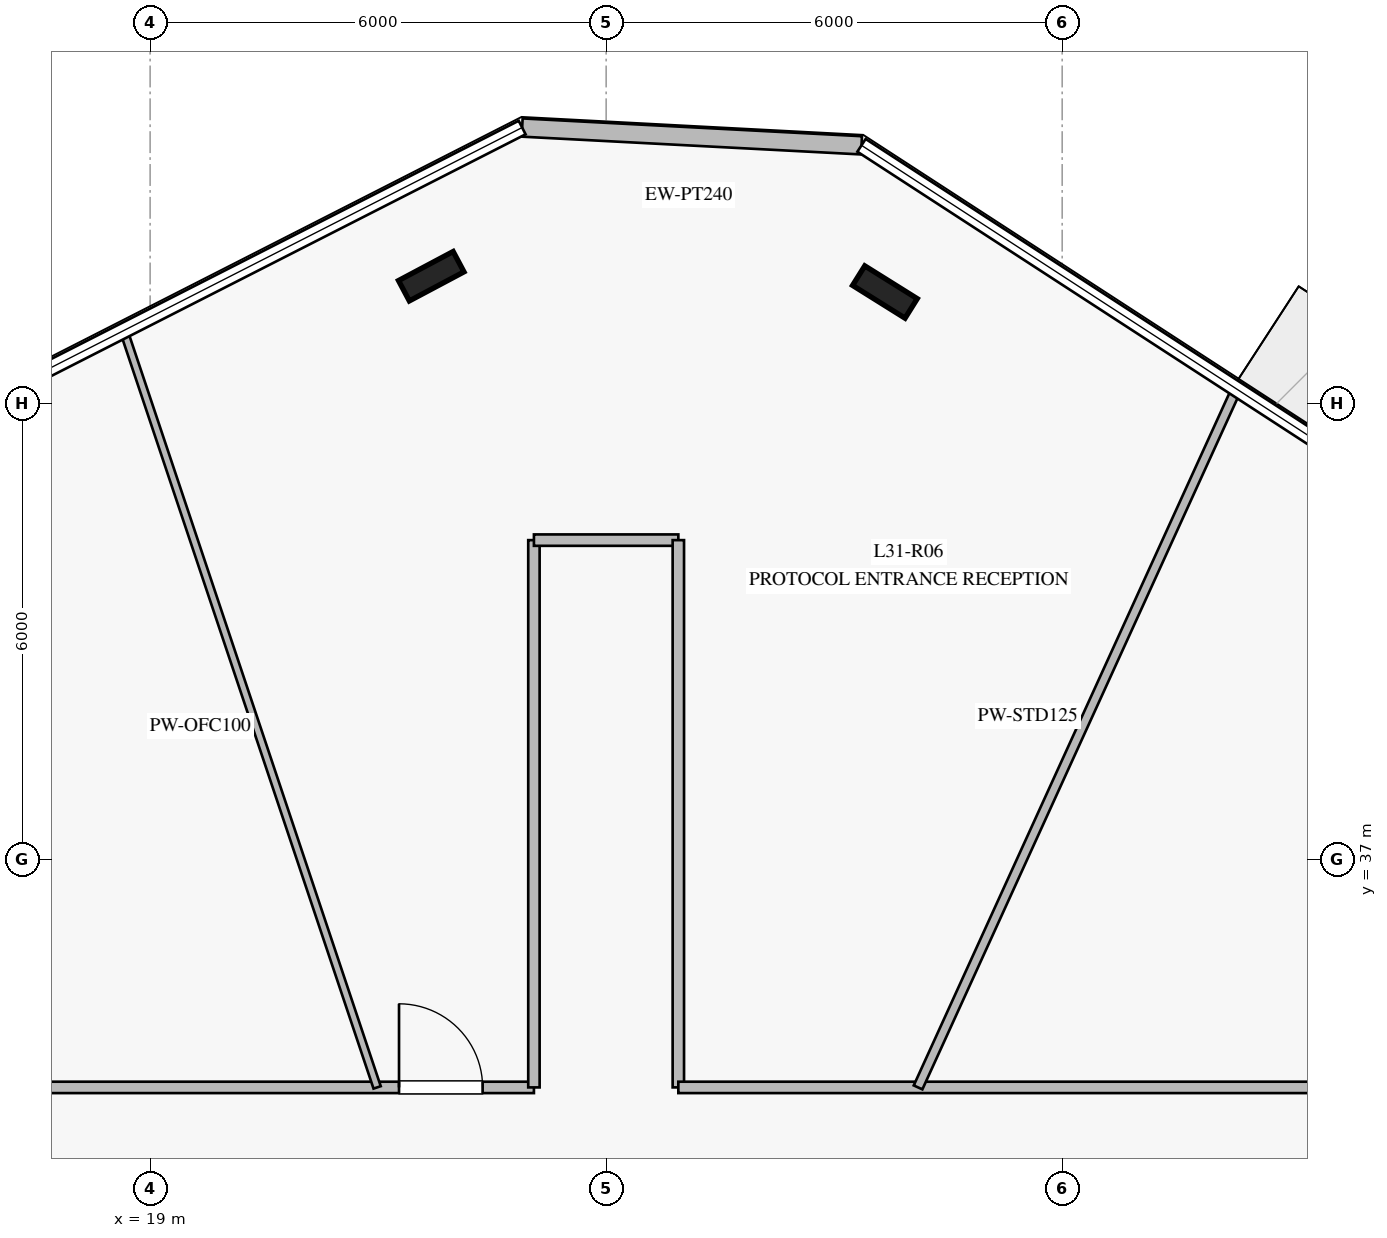
"""IFC4 building model, lengths in metres.
Left out: names, types, materials, properties, quantities, classifications, styles, units other than length and angle.
Written with IfcOpenShell. Run it as: python <this file> out.ifc"""

import sys

from ifc_helpers import new_model, si_unit, direction, frame, frame_2d, origin, origin_2d, place, context, subcontext, project, spatial, rectangle, i_section, extrude, element, fill, save


model = new_model("IFC4")
c1 = context("Model", 3, precision=1e-05, world=origin(), true_north=direction((0.0, 1.0)))
c2 = subcontext(c1, "Body", "Model", "MODEL_VIEW")
j1 = project(units=[si_unit("LENGTHUNIT", "METRE"), si_unit("PLANEANGLEUNIT", "RADIAN")], contexts=[c1])
p1 = place(None, origin())
s1 = spatial("IfcSite", under=j1, at=p1, CompositionType="ELEMENT")
p2 = place(p1, origin())
s2 = spatial("IfcBuilding", under=s1, at=p2, CompositionType="ELEMENT")
p3 = place(p2, frame((0.0, 0.0, 130.4)))
s3 = spatial("IfcBuildingStorey", under=s2, at=p3, CompositionType="ELEMENT", Elevation=130.4)
for number, where, z_axis, x_axis in (
    (1, (28.668, 44.464, 0.0), (0.0, 0.0, 1.0), (-0.848, 0.53, 0.0)),
    (2, (22.699, 44.672, 0.0), (0.0, 0.0, 1.0), (0.883, 0.469, 0.0)),
):
    element("IfcColumn", number, at=place(p3, frame(where, z_axis=z_axis, x_axis=x_axis)), inside=s3, PredefinedType="COLUMN", context=c2, shape_type="SweptSolid", body=[
        extrude(i_section(OverallWidth=0.303, OverallDepth=0.814, WebThickness=0.021, FlangeThickness=0.04, at=origin_2d()), origin(), (0.0, 0.0, 1.0), 4.0),
    ])
p4 = place(p3, frame((28.36, 46.394, 0.0), z_axis=(0.0, 0.0, 1.0), x_axis=(-0.998630920983, 0.052309498732, 0.0)))
e3 = element("IfcWall", 3, at=p4, inside=s3, PredefinedType="STANDARD", context=c2, shape_type="SweptSolid", body=[
    extrude(rectangle(XDim=4.471, YDim=0.24, at=frame_2d((2.236, 0.0))), origin(), (0.0, 0.0, 1.0), 3.76),
])
p5 = place(p3, frame((17.2, 34.0, 0.0), z_axis=(0.0, 0.0, 1.0), x_axis=(1.0, 0.0, 0.0)))
e4 = element("IfcWall", 4, at=p5, inside=s3, PredefinedType="PARTITIONING", context=c2, shape_type="SweptSolid", body=[
    extrude(rectangle(XDim=6.85, YDim=0.15, at=frame_2d((3.425, 0.0))), origin(), (0.0, 0.0, 1.0), 3.21),
])
p6 = place(p5, frame((5.075, 0.0, 0.0)))
e5 = element("IfcOpeningElement", 5, at=p6, cuts=e4, PredefinedType="OPENING", context=c2, shape_type="SweptSolid", body=[
    extrude(rectangle(XDim=1.1, YDim=2.2, at=frame_2d((0.55, 1.1))), frame((0.0, 0.085, 0.0), z_axis=(0.0, -1.0, 0.0), x_axis=(1.0, 0.0, 0.0)), (0.0, 0.0, 1.0), 0.17),
])
p7 = place(p3, frame((24.05, 34.0, 0.0), z_axis=(0.0, 0.0, 1.0), x_axis=(0.0, 1.0, 0.0)))
e6 = element("IfcWall", 6, at=p7, inside=s3, PredefinedType="PARTITIONING", context=c2, shape_type="SweptSolid", body=[
    extrude(rectangle(XDim=7.2, YDim=0.15, at=frame_2d((3.6, 0.0))), origin(), (0.0, 0.0, 1.0), 3.36),
])
p8 = place(p3, frame((24.05, 41.2, 0.0), z_axis=(0.0, 0.0, 1.0), x_axis=(1.0, 0.0, 0.0)))
e7 = element("IfcWall", 7, at=p8, inside=s3, PredefinedType="PARTITIONING", context=c2, shape_type="SweptSolid", body=[
    extrude(rectangle(XDim=1.9, YDim=0.15, at=frame_2d((0.95, 0.0))), origin(), (0.0, 0.0, 1.0), 3.76),
])
p9 = place(p3, frame((25.95, 41.2, 0.0), z_axis=(0.0, 0.0, 1.0), x_axis=(0.0, -1.0, 0.0)))
e8 = element("IfcWall", 8, at=p9, inside=s3, PredefinedType="PARTITIONING", context=c2, shape_type="SweptSolid", body=[
    extrude(rectangle(XDim=7.2, YDim=0.15, at=frame_2d((3.6, 0.0))), origin(), (0.0, 0.0, 1.0), 3.36),
])
p10 = place(p3, frame((25.95, 34.0, 0.0), z_axis=(0.0, 0.0, 1.0), x_axis=(1.0, 0.0, 0.0)))
e9 = element("IfcWall", 9, at=p10, inside=s3, PredefinedType="PARTITIONING", context=c2, shape_type="SweptSolid", body=[
    extrude(rectangle(XDim=15.25, YDim=0.15, at=frame_2d((7.625, 0.0))), origin(), (0.0, 0.0, 1.0), 3.21),
])
p11 = place(p10, frame((8.487, 0.0, 0.0)))
e10 = element("IfcOpeningElement", 10, at=p11, cuts=e9, PredefinedType="OPENING", context=c2, shape_type="SweptSolid", body=[
    extrude(rectangle(XDim=1.1, YDim=2.2, at=frame_2d((0.55, 1.1))), frame((0.0, 0.085, 0.0), z_axis=(0.0, -1.0, 0.0), x_axis=(1.0, 0.0, 0.0)), (0.0, 0.0, 1.0), 0.17),
])
p12 = place(p3, frame((29.104, 34.0, 0.0), z_axis=(0.0, 0.0, 1.0), x_axis=(0.414877179532, 0.90987742356, 0.0)))
e11 = element("IfcWall", 11, at=p12, inside=s3, PredefinedType="PARTITIONING", context=c2, shape_type="SweptSolid", body=[
    extrude(rectangle(XDim=10.083, YDim=0.125, at=frame_2d((5.042, 0.0))), origin(), (0.0, 0.0, 1.0), 3.05),
])
p13 = place(p3, frame((21.987, 34.0, 0.0), z_axis=(0.0, 0.0, 1.0), x_axis=(-0.317554871219, 0.948239897792, 0.0)))
e12 = element("IfcWall", 12, at=p13, inside=s3, PredefinedType="MOVABLE", context=c2, shape_type="SweptSolid", body=[
    extrude(rectangle(XDim=10.484, YDim=0.1, at=frame_2d((5.242, 0.0))), origin(), (0.0, 0.0, 1.0), 3.16),
])
p14 = place(p6, origin())
e13 = element("IfcDoor", 13, at=p14, inside=s3, OperationType="SINGLE_SWING_LEFT", PredefinedType="DOOR", context=c2, shape_type="SweptSolid", body=[
    extrude(rectangle(XDim=1.1, YDim=2.2, at=frame_2d((0.55, 1.1))), frame((0.0, 0.025, 0.0), z_axis=(0.0, -1.0, 0.0), x_axis=(1.0, 0.0, 0.0)), (0.0, 0.0, 1.0), 0.05),
])
fill(e5, e13)
save(model, sys.argv[1])
